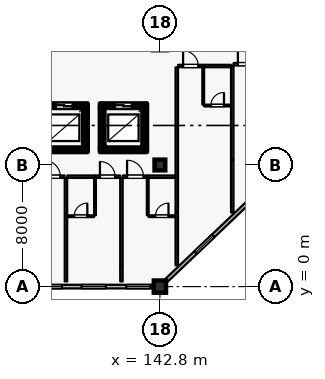
"""IFC4 building model, lengths in metres.
Left out: names, types, materials, properties, quantities, classifications, styles, units other than length and angle.
Written with IfcOpenShell. Run it as: python <this file> out.ifc"""

import sys

from ifc_helpers import new_model, si_unit, direction, frame, frame_2d, origin, origin_2d, place, context, subcontext, project, spatial, rectangle, extrude, element, fill, save


model = new_model("IFC4")
c1 = context("Model", 3, precision=1e-05, world=origin(), true_north=direction((0.0, 1.0)))
c2 = subcontext(c1, "Body", "Model", "MODEL_VIEW")
j1 = project(units=[si_unit("LENGTHUNIT", "METRE"), si_unit("PLANEANGLEUNIT", "RADIAN")], contexts=[c1])
p1 = place(None, origin())
s1 = spatial("IfcSite", under=j1, at=p1, CompositionType="ELEMENT")
p2 = place(p1, origin())
s2 = spatial("IfcBuilding", under=s1, at=p2, CompositionType="ELEMENT")
p3 = place(p2, frame((0.0, 0.0, 11.4)))
s3 = spatial("IfcBuildingStorey", under=s2, at=p3, CompositionType="ELEMENT", Elevation=11.4)
p4 = place(p3, frame((142.8, 0.0, 0.0), z_axis=(0.0, 0.0, 1.0), x_axis=(1.0, 0.0, 0.0)))
e1 = element("IfcColumn", 1, at=p4, inside=s3, PredefinedType="COLUMN", context=c2, shape_type="SweptSolid", body=[
    extrude(rectangle(XDim=0.8, YDim=0.8, at=origin_2d()), origin(), (0.0, 0.0, 1.0), 4.8),
])
p5 = place(p3, frame((142.8, 8.0, 0.0), z_axis=(0.0, 0.0, 1.0), x_axis=(1.0, 0.0, 0.0)))
e2 = element("IfcColumn", 2, at=p5, inside=s3, PredefinedType="COLUMN", context=c2, shape_type="SweptSolid", body=[
    extrude(rectangle(XDim=0.7, YDim=0.7, at=origin_2d()), origin(), (0.0, 0.0, 1.0), 4.8),
])
p6 = place(p3, frame((142.4, 0.0, 0.0), z_axis=(0.0, 0.0, 1.0), x_axis=(-1.0, 0.0, 0.0)))
e3 = element("IfcWall", 3, at=p6, inside=s3, PredefinedType="SOLIDWALL", context=c2, shape_type="SweptSolid", body=[
    extrude(rectangle(XDim=7.6, YDim=0.24, at=frame_2d((3.8, 0.0))), origin(), (0.0, 0.0, 1.0), 4.13),
])
p7 = place(p6, frame((0.215, 0.0, 0.8)))
e4 = element("IfcOpeningElement", 4, at=p7, cuts=e3, PredefinedType="OPENING", context=c2, shape_type="SweptSolid", body=[
    extrude(rectangle(XDim=1.6, YDim=1.6, at=frame_2d((0.8, 0.8))), frame((0.0, 0.13, 0.0), z_axis=(0.0, -1.0, 0.0), x_axis=(1.0, 0.0, 0.0)), (0.0, 0.0, 1.0), 0.26),
])
p8 = place(p6, frame((3.155, 0.0, 0.8)))
e5 = element("IfcOpeningElement", 5, at=p8, cuts=e3, PredefinedType="OPENING", context=c2, shape_type="SweptSolid", body=[
    extrude(rectangle(XDim=1.6, YDim=1.6, at=frame_2d((0.8, 0.8))), frame((0.0, 0.13, 0.0), z_axis=(0.0, -1.0, 0.0), x_axis=(1.0, 0.0, 0.0)), (0.0, 0.0, 1.0), 0.26),
])
p9 = place(p6, frame((6.04, 0.0, 0.8)))
e6 = element("IfcOpeningElement", 6, at=p9, cuts=e3, PredefinedType="OPENING", context=c2, shape_type="SweptSolid", body=[
    extrude(rectangle(XDim=1.4, YDim=1.6, at=frame_2d((0.7, 0.8))), frame((0.0, 0.13, 0.0), z_axis=(0.0, -1.0, 0.0), x_axis=(1.0, 0.0, 0.0)), (0.0, 0.0, 1.0), 0.26),
])
p10 = place(p3, frame((150.8, 7.619, 0.0), z_axis=(0.0, 0.0, 1.0), x_axis=(-0.724156739794, -0.689635422677, 0.0)))
e7 = element("IfcWall", 7, at=p10, inside=s3, PredefinedType="SOLIDWALL", context=c2, shape_type="SweptSolid", body=[
    extrude(rectangle(XDim=10.495, YDim=0.24, at=frame_2d((5.248, 0.0))), origin(), (0.0, 0.0, 1.0), 4.13),
])
p11 = place(p10, frame((1.368, 0.0, 0.8)))
e8 = element("IfcOpeningElement", 8, at=p11, cuts=e7, PredefinedType="OPENING", context=c2, shape_type="SweptSolid", body=[
    extrude(rectangle(XDim=1.6, YDim=1.6, at=frame_2d((0.8, 0.8))), frame((0.0, 0.13, 0.0), z_axis=(0.0, -1.0, 0.0), x_axis=(1.0, 0.0, 0.0)), (0.0, 0.0, 1.0), 0.26),
])
p12 = place(p10, frame((6.194, 0.0, 0.8)))
e9 = element("IfcOpeningElement", 9, at=p12, cuts=e7, PredefinedType="OPENING", context=c2, shape_type="SweptSolid", body=[
    extrude(rectangle(XDim=1.6, YDim=1.6, at=frame_2d((0.8, 0.8))), frame((0.0, 0.13, 0.0), z_axis=(0.0, -1.0, 0.0), x_axis=(1.0, 0.0, 0.0)), (0.0, 0.0, 1.0), 0.26),
])
p13 = place(p3, frame((134.95, 9.0, 0.0), z_axis=(0.0, 0.0, 1.0), x_axis=(1.0, 0.0, 0.0)))
e10 = element("IfcWall", 10, at=p13, inside=s3, PredefinedType="SHEAR", context=c2, shape_type="SweptSolid", body=[
    extrude(rectangle(XDim=3.1, YDim=0.3, at=frame_2d((1.55, 0.0))), origin(), (0.0, 0.0, 1.0), 4.535),
])
p14 = place(p3, frame((137.9, 9.155, 0.0), z_axis=(0.0, 0.0, 1.0), x_axis=(0.0, 1.0, 0.0)))
e11 = element("IfcWall", 11, at=p14, inside=s3, PredefinedType="SHEAR", context=c2, shape_type="SweptSolid", body=[
    extrude(rectangle(XDim=2.59, YDim=0.3, at=frame_2d((1.295, 0.0))), origin(), (0.0, 0.0, 1.0), 4.535),
])
p15 = place(p3, frame((138.05, 11.9, 0.0), z_axis=(0.0, 0.0, 1.0), x_axis=(-1.0, 0.0, 0.0)))
e12 = element("IfcWall", 12, at=p15, inside=s3, PredefinedType="SHEAR", context=c2, shape_type="SweptSolid", body=[
    extrude(rectangle(XDim=3.1, YDim=0.3, at=frame_2d((1.55, 0.0))), origin(), (0.0, 0.0, 1.0), 4.535),
])
p16 = place(p15, frame((1.0, 0.0, 0.0)))
e13 = element("IfcOpeningElement", 13, at=p16, cuts=e12, PredefinedType="OPENING", context=c2, shape_type="SweptSolid", body=[
    extrude(rectangle(XDim=1.1, YDim=2.2, at=frame_2d((0.55, 1.1))), frame((0.0, 0.16, 0.0), z_axis=(0.0, -1.0, 0.0), x_axis=(1.0, 0.0, 0.0)), (0.0, 0.0, 1.0), 0.32),
])
p17 = place(p3, frame((138.85, 9.0, 0.0), z_axis=(0.0, 0.0, 1.0), x_axis=(1.0, 0.0, 0.0)))
e14 = element("IfcWall", 14, at=p17, inside=s3, PredefinedType="SHEAR", context=c2, shape_type="SweptSolid", body=[
    extrude(rectangle(XDim=3.1, YDim=0.3, at=frame_2d((1.55, 0.0))), origin(), (0.0, 0.0, 1.0), 4.535),
])
p18 = place(p3, frame((141.8, 9.155, 0.0), z_axis=(0.0, 0.0, 1.0), x_axis=(0.0, 1.0, 0.0)))
e15 = element("IfcWall", 15, at=p18, inside=s3, PredefinedType="SHEAR", context=c2, shape_type="SweptSolid", body=[
    extrude(rectangle(XDim=2.59, YDim=0.3, at=frame_2d((1.295, 0.0))), origin(), (0.0, 0.0, 1.0), 4.535),
])
p19 = place(p3, frame((141.95, 11.9, 0.0), z_axis=(0.0, 0.0, 1.0), x_axis=(-1.0, 0.0, 0.0)))
e16 = element("IfcWall", 16, at=p19, inside=s3, PredefinedType="SHEAR", context=c2, shape_type="SweptSolid", body=[
    extrude(rectangle(XDim=3.1, YDim=0.3, at=frame_2d((1.55, 0.0))), origin(), (0.0, 0.0, 1.0), 4.535),
])
p20 = place(p19, frame((1.0, 0.0, 0.0)))
e17 = element("IfcOpeningElement", 17, at=p20, cuts=e16, PredefinedType="OPENING", context=c2, shape_type="SweptSolid", body=[
    extrude(rectangle(XDim=1.1, YDim=2.2, at=frame_2d((0.55, 1.1))), frame((0.0, 0.16, 0.0), z_axis=(0.0, -1.0, 0.0), x_axis=(1.0, 0.0, 0.0)), (0.0, 0.0, 1.0), 0.32),
])
p21 = place(p3, frame((139.0, 11.745, 0.0), z_axis=(0.0, 0.0, 1.0), x_axis=(0.0, -1.0, 0.0)))
e18 = element("IfcWall", 18, at=p21, inside=s3, PredefinedType="SHEAR", context=c2, shape_type="SweptSolid", body=[
    extrude(rectangle(XDim=2.59, YDim=0.3, at=frame_2d((1.295, 0.0))), origin(), (0.0, 0.0, 1.0), 4.535),
])
p22 = place(p3, frame((134.89, 7.23, 0.0), z_axis=(0.0, 0.0, 1.0), x_axis=(1.0, 0.0, 0.0)))
e19 = element("IfcWall", 19, at=p22, inside=s3, PredefinedType="PARTITIONING", context=c2, shape_type="SweptSolid", body=[
    extrude(rectangle(XDim=1.64, YDim=0.16, at=frame_2d((0.82, 0.0))), origin(), (0.0, 0.0, 1.0), 4.535),
])
p23 = place(p22, frame((0.28, 0.0, 0.0)))
e20 = element("IfcOpeningElement", 20, at=p23, cuts=e19, PredefinedType="OPENING", context=c2, shape_type="SweptSolid", body=[
    extrude(rectangle(XDim=1.08, YDim=2.3, at=frame_2d((0.54, 1.15))), frame((0.0, 0.09, 0.0), z_axis=(0.0, -1.0, 0.0), x_axis=(1.0, 0.0, 0.0)), (0.0, 0.0, 1.0), 0.18),
])
p24 = place(p3, frame((136.71, 7.23, 0.0), z_axis=(0.0, 0.0, 1.0), x_axis=(1.0, 0.0, 0.0)))
e21 = element("IfcWall", 21, at=p24, inside=s3, PredefinedType="PARTITIONING", context=c2, shape_type="SweptSolid", body=[
    extrude(rectangle(XDim=1.81, YDim=0.16, at=frame_2d((0.905, 0.0))), origin(), (0.0, 0.0, 1.0), 4.535),
])
p25 = place(p3, frame((138.53, 7.23, 0.0), z_axis=(0.0, 0.0, 1.0), x_axis=(1.0, 0.0, 0.0)))
e22 = element("IfcWall", 22, at=p25, inside=s3, PredefinedType="PARTITIONING", context=c2, shape_type="SweptSolid", body=[
    extrude(rectangle(XDim=1.65, YDim=0.16, at=frame_2d((0.825, 0.0))), origin(), (0.0, 0.0, 1.0), 4.535),
])
p26 = place(p25, frame((0.325, 0.0, 0.0)))
e23 = element("IfcOpeningElement", 23, at=p26, cuts=e22, PredefinedType="OPENING", context=c2, shape_type="SweptSolid", body=[
    extrude(rectangle(XDim=1.0, YDim=2.25, at=frame_2d((0.5, 1.125))), frame((0.0, 0.09, 0.0), z_axis=(0.0, -1.0, 0.0), x_axis=(1.0, 0.0, 0.0)), (0.0, 0.0, 1.0), 0.18),
])
p27 = place(p3, frame((138.53, 4.69, 0.0), z_axis=(0.0, 0.0, 1.0), x_axis=(0.0, 1.0, 0.0)))
e24 = element("IfcWall", 24, at=p27, inside=s3, PredefinedType="PARTITIONING", context=c2, shape_type="SweptSolid", body=[
    extrude(rectangle(XDim=2.45, YDim=0.115, at=frame_2d((1.225, 0.0))), origin(), (0.0, 0.0, 1.0), 4.535),
])
p28 = place(p3, frame((136.72, 4.63, 0.0), z_axis=(0.0, 0.0, 1.0), x_axis=(1.0, 0.0, 0.0)))
e25 = element("IfcWall", 25, at=p28, inside=s3, PredefinedType="PARTITIONING", context=c2, shape_type="SweptSolid", body=[
    extrude(rectangle(XDim=1.75, YDim=0.115, at=frame_2d((0.875, 0.0))), origin(), (0.0, 0.0, 1.0), 4.535),
])
p29 = place(p28, frame((0.445, 0.0, 0.0)))
e26 = element("IfcOpeningElement", 26, at=p29, cuts=e25, PredefinedType="OPENING", context=c2, shape_type="SweptSolid", body=[
    extrude(rectangle(XDim=0.86, YDim=2.12, at=frame_2d((0.43, 1.06))), frame((0.0, 0.067, 0.0), z_axis=(0.0, -1.0, 0.0), x_axis=(1.0, 0.0, 0.0)), (0.0, 0.0, 1.0), 0.135),
])
p30 = place(p3, frame((136.62, 0.34, 0.0), z_axis=(0.0, 0.0, 1.0), x_axis=(0.0, 1.0, 0.0)))
e27 = element("IfcWall", 27, at=p30, inside=s3, PredefinedType="PARTITIONING", context=c2, shape_type="SweptSolid", body=[
    extrude(rectangle(XDim=6.8, YDim=0.16, at=frame_2d((3.4, 0.0))), origin(), (0.0, 0.0, 1.0), 4.535),
])
p31 = place(p3, frame((140.27, 0.34, 0.0), z_axis=(0.0, 0.0, 1.0), x_axis=(0.0, 1.0, 0.0)))
e28 = element("IfcWall", 28, at=p31, inside=s3, PredefinedType="PARTITIONING", context=c2, shape_type="SweptSolid", body=[
    extrude(rectangle(XDim=1.05, YDim=0.16, at=frame_2d((0.525, 0.0))), origin(), (0.0, 0.0, 1.0), 4.535),
])
p32 = place(p3, frame((140.36, 7.23, 0.0), z_axis=(0.0, 0.0, 1.0), x_axis=(1.0, 0.0, 0.0)))
e29 = element("IfcWall", 29, at=p32, inside=s3, PredefinedType="PARTITIONING", context=c2, shape_type="SweptSolid", body=[
    extrude(rectangle(XDim=1.64, YDim=0.16, at=frame_2d((0.82, 0.0))), origin(), (0.0, 0.0, 1.0), 4.535),
])
p33 = place(p32, frame((0.28, 0.0, 0.0)))
e30 = element("IfcOpeningElement", 30, at=p33, cuts=e29, PredefinedType="OPENING", context=c2, shape_type="SweptSolid", body=[
    extrude(rectangle(XDim=1.08, YDim=2.3, at=frame_2d((0.54, 1.15))), frame((0.0, 0.09, 0.0), z_axis=(0.0, -1.0, 0.0), x_axis=(1.0, 0.0, 0.0)), (0.0, 0.0, 1.0), 0.18),
])
p34 = place(p3, frame((142.01, 7.23, 0.0), z_axis=(0.0, 0.0, 1.0), x_axis=(1.0, 0.0, 0.0)))
e31 = element("IfcWall", 31, at=p34, inside=s3, PredefinedType="PARTITIONING", context=c2, shape_type="SweptSolid", body=[
    extrude(rectangle(XDim=1.81, YDim=0.16, at=frame_2d((0.905, 0.0))), origin(), (0.0, 0.0, 1.0), 4.535),
])
p35 = place(p3, frame((142.0, 4.69, 0.0), z_axis=(0.0, 0.0, 1.0), x_axis=(0.0, 1.0, 0.0)))
e32 = element("IfcWall", 32, at=p35, inside=s3, PredefinedType="PARTITIONING", context=c2, shape_type="SweptSolid", body=[
    extrude(rectangle(XDim=2.45, YDim=0.115, at=frame_2d((1.225, 0.0))), origin(), (0.0, 0.0, 1.0), 4.535),
])
p36 = place(p3, frame((142.06, 4.63, 0.0), z_axis=(0.0, 0.0, 1.0), x_axis=(1.0, 0.0, 0.0)))
e33 = element("IfcWall", 33, at=p36, inside=s3, PredefinedType="PARTITIONING", context=c2, shape_type="SweptSolid", body=[
    extrude(rectangle(XDim=1.75, YDim=0.115, at=frame_2d((0.875, 0.0))), origin(), (0.0, 0.0, 1.0), 4.535),
])
p37 = place(p36, frame((0.445, 0.0, 0.0)))
e34 = element("IfcOpeningElement", 34, at=p37, cuts=e33, PredefinedType="OPENING", context=c2, shape_type="SweptSolid", body=[
    extrude(rectangle(XDim=0.86, YDim=2.12, at=frame_2d((0.43, 1.06))), frame((0.0, 0.067, 0.0), z_axis=(0.0, -1.0, 0.0), x_axis=(1.0, 0.0, 0.0)), (0.0, 0.0, 1.0), 0.135),
])
p38 = place(p3, frame((140.27, 1.4, 0.0), z_axis=(0.0, 0.0, 1.0), x_axis=(0.0, 1.0, 0.0)))
e35 = element("IfcWall", 35, at=p38, inside=s3, PredefinedType="PARTITIONING", context=c2, shape_type="SweptSolid", body=[
    extrude(rectangle(XDim=5.74, YDim=0.16, at=frame_2d((2.87, 0.0))), origin(), (0.0, 0.0, 1.0), 4.535),
])
p39 = place(p3, frame((143.91, 1.4, 0.0), z_axis=(0.0, 0.0, 1.0), x_axis=(0.0, 1.0, 0.0)))
e36 = element("IfcWall", 36, at=p39, inside=s3, PredefinedType="PARTITIONING", context=c2, shape_type="SweptSolid", body=[
    extrude(rectangle(XDim=3.46, YDim=0.16, at=frame_2d((1.73, 0.0))), origin(), (0.0, 0.0, 1.0), 4.535),
])
p40 = place(p3, frame((144.0, 14.51, 0.0), z_axis=(0.0, 0.0, 1.0), x_axis=(1.0, 0.0, 0.0)))
e37 = element("IfcWall", 37, at=p40, inside=s3, PredefinedType="PARTITIONING", context=c2, shape_type="SweptSolid", body=[
    extrude(rectangle(XDim=1.65, YDim=0.16, at=frame_2d((0.825, 0.0))), origin(), (0.0, 0.0, 1.0), 4.535),
])
p41 = place(p40, frame((0.325, 0.0, 0.0)))
e38 = element("IfcOpeningElement", 38, at=p41, cuts=e37, PredefinedType="OPENING", context=c2, shape_type="SweptSolid", body=[
    extrude(rectangle(XDim=1.0, YDim=2.25, at=frame_2d((0.5, 1.125))), frame((0.0, 0.09, 0.0), z_axis=(0.0, -1.0, 0.0), x_axis=(1.0, 0.0, 0.0)), (0.0, 0.0, 1.0), 0.18),
])
p42 = place(p3, frame((145.66, 14.51, 0.0), z_axis=(0.0, 0.0, 1.0), x_axis=(1.0, 0.0, 0.0)))
e39 = element("IfcWall", 39, at=p42, inside=s3, PredefinedType="PARTITIONING", context=c2, shape_type="SweptSolid", body=[
    extrude(rectangle(XDim=1.81, YDim=0.16, at=frame_2d((0.905, 0.0))), origin(), (0.0, 0.0, 1.0), 4.535),
])
p43 = place(p3, frame((145.65, 11.97, 0.0), z_axis=(0.0, 0.0, 1.0), x_axis=(0.0, 1.0, 0.0)))
e40 = element("IfcWall", 40, at=p43, inside=s3, PredefinedType="PARTITIONING", context=c2, shape_type="SweptSolid", body=[
    extrude(rectangle(XDim=2.45, YDim=0.115, at=frame_2d((1.225, 0.0))), origin(), (0.0, 0.0, 1.0), 4.535),
])
p44 = place(p3, frame((145.71, 11.91, 0.0), z_axis=(0.0, 0.0, 1.0), x_axis=(1.0, 0.0, 0.0)))
e41 = element("IfcWall", 41, at=p44, inside=s3, PredefinedType="PARTITIONING", context=c2, shape_type="SweptSolid", body=[
    extrude(rectangle(XDim=1.75, YDim=0.115, at=frame_2d((0.875, 0.0))), origin(), (0.0, 0.0, 1.0), 4.535),
])
p45 = place(p44, frame((0.445, 0.0, 0.0)))
e42 = element("IfcOpeningElement", 42, at=p45, cuts=e41, PredefinedType="OPENING", context=c2, shape_type="SweptSolid", body=[
    extrude(rectangle(XDim=0.86, YDim=2.12, at=frame_2d((0.43, 1.06))), frame((0.0, 0.067, 0.0), z_axis=(0.0, -1.0, 0.0), x_axis=(1.0, 0.0, 0.0)), (0.0, 0.0, 1.0), 0.135),
])
p46 = place(p3, frame((143.91, 4.87, 0.0), z_axis=(0.0, 0.0, 1.0), x_axis=(0.0, 1.0, 0.0)))
e43 = element("IfcWall", 43, at=p46, inside=s3, PredefinedType="PARTITIONING", context=c2, shape_type="SweptSolid", body=[
    extrude(rectangle(XDim=9.55, YDim=0.16, at=frame_2d((4.775, 0.0))), origin(), (0.0, 0.0, 1.0), 4.535),
])
p47 = place(p3, frame((147.56, 4.87, 0.0), z_axis=(0.0, 0.0, 1.0), x_axis=(0.0, 1.0, 0.0)))
e44 = element("IfcWall", 44, at=p47, inside=s3, PredefinedType="PARTITIONING", context=c2, shape_type="SweptSolid", body=[
    extrude(rectangle(XDim=3.46, YDim=0.16, at=frame_2d((1.73, 0.0))), origin(), (0.0, 0.0, 1.0), 4.535),
])
p48 = place(p3, frame((147.65, 14.63, 0.0), z_axis=(0.0, 0.0, 1.0), x_axis=(1.0, 0.0, 0.0)))
e45 = element("IfcWall", 45, at=p48, inside=s3, PredefinedType="PARTITIONING", context=c2, shape_type="SweptSolid", body=[
    extrude(rectangle(XDim=1.64, YDim=0.16, at=frame_2d((0.82, 0.0))), origin(), (0.0, 0.0, 1.0), 4.535),
])
p49 = place(p48, frame((0.28, 0.0, 0.0)))
e46 = element("IfcOpeningElement", 46, at=p49, cuts=e45, PredefinedType="OPENING", context=c2, shape_type="SweptSolid", body=[
    extrude(rectangle(XDim=1.08, YDim=2.3, at=frame_2d((0.54, 1.15))), frame((0.0, 0.09, 0.0), z_axis=(0.0, -1.0, 0.0), x_axis=(1.0, 0.0, 0.0)), (0.0, 0.0, 1.0), 0.18),
])
p50 = place(p3, frame((147.56, 8.34, 0.0), z_axis=(0.0, 0.0, 1.0), x_axis=(0.0, 1.0, 0.0)))
e47 = element("IfcWall", 47, at=p50, inside=s3, PredefinedType="PARTITIONING", context=c2, shape_type="SweptSolid", body=[
    extrude(rectangle(XDim=6.2, YDim=0.16, at=frame_2d((3.1, 0.0))), origin(), (0.0, 0.0, 1.0), 4.535),
])
p51 = place(p7, origin())
e48 = element("IfcWindow", 48, at=p51, inside=s3, PartitioningType="SINGLE_PANEL", PredefinedType="WINDOW", context=c2, shape_type="SweptSolid", body=[
    extrude(rectangle(XDim=1.6, YDim=1.6, at=frame_2d((0.8, 0.8))), frame((0.0, 0.03, 0.0), z_axis=(0.0, -1.0, 0.0), x_axis=(1.0, 0.0, 0.0)), (0.0, 0.0, 1.0), 0.06),
])
fill(e4, e48)
p52 = place(p8, origin())
e49 = element("IfcWindow", 49, at=p52, inside=s3, PartitioningType="SINGLE_PANEL", PredefinedType="WINDOW", context=c2, shape_type="SweptSolid", body=[
    extrude(rectangle(XDim=1.6, YDim=1.6, at=frame_2d((0.8, 0.8))), frame((0.0, 0.03, 0.0), z_axis=(0.0, -1.0, 0.0), x_axis=(1.0, 0.0, 0.0)), (0.0, 0.0, 1.0), 0.06),
])
fill(e5, e49)
p53 = place(p9, origin())
e50 = element("IfcWindow", 50, at=p53, inside=s3, PartitioningType="SINGLE_PANEL", PredefinedType="WINDOW", context=c2, shape_type="SweptSolid", body=[
    extrude(rectangle(XDim=1.4, YDim=1.6, at=frame_2d((0.7, 0.8))), frame((0.0, 0.03, 0.0), z_axis=(0.0, -1.0, 0.0), x_axis=(1.0, 0.0, 0.0)), (0.0, 0.0, 1.0), 0.06),
])
fill(e6, e50)
p54 = place(p12, origin())
e51 = element("IfcWindow", 51, at=p54, inside=s3, PartitioningType="SINGLE_PANEL", PredefinedType="WINDOW", context=c2, shape_type="SweptSolid", body=[
    extrude(rectangle(XDim=1.6, YDim=1.6, at=frame_2d((0.8, 0.8))), frame((0.0, 0.03, 0.0), z_axis=(0.0, -1.0, 0.0), x_axis=(1.0, 0.0, 0.0)), (0.0, 0.0, 1.0), 0.06),
])
fill(e9, e51)
p55 = place(p16, origin())
e52 = element("IfcDoor", 52, at=p55, inside=s3, OperationType="DOUBLE_DOOR_SLIDING", PredefinedType="DOOR", context=c2, shape_type="SweptSolid", body=[
    extrude(rectangle(XDim=1.1, YDim=2.2, at=frame_2d((0.55, 1.1))), frame((0.0, 0.025, 0.0), z_axis=(0.0, -1.0, 0.0), x_axis=(1.0, 0.0, 0.0)), (0.0, 0.0, 1.0), 0.05),
])
fill(e13, e52)
p56 = place(p20, origin())
e53 = element("IfcDoor", 53, at=p56, inside=s3, OperationType="DOUBLE_DOOR_SLIDING", PredefinedType="DOOR", context=c2, shape_type="SweptSolid", body=[
    extrude(rectangle(XDim=1.1, YDim=2.2, at=frame_2d((0.55, 1.1))), frame((0.0, 0.025, 0.0), z_axis=(0.0, -1.0, 0.0), x_axis=(1.0, 0.0, 0.0)), (0.0, 0.0, 1.0), 0.05),
])
fill(e17, e53)
p57 = place(p23, origin())
e54 = element("IfcDoor", 54, at=p57, inside=s3, OperationType="SINGLE_SWING_LEFT", PredefinedType="DOOR", context=c2, shape_type="SweptSolid", body=[
    extrude(rectangle(XDim=1.08, YDim=2.3, at=frame_2d((0.54, 1.15))), frame((0.0, 0.025, 0.0), z_axis=(0.0, -1.0, 0.0), x_axis=(1.0, 0.0, 0.0)), (0.0, 0.0, 1.0), 0.05),
])
fill(e20, e54)
p58 = place(p26, origin())
e55 = element("IfcDoor", 55, at=p58, inside=s3, OperationType="SINGLE_SWING_LEFT", PredefinedType="DOOR", context=c2, shape_type="SweptSolid", body=[
    extrude(rectangle(XDim=1.0, YDim=2.25, at=frame_2d((0.5, 1.125))), frame((0.0, 0.025, 0.0), z_axis=(0.0, -1.0, 0.0), x_axis=(1.0, 0.0, 0.0)), (0.0, 0.0, 1.0), 0.05),
])
fill(e23, e55)
p59 = place(p29, origin())
e56 = element("IfcDoor", 56, at=p59, inside=s3, OperationType="SINGLE_SWING_RIGHT", PredefinedType="DOOR", context=c2, shape_type="SweptSolid", body=[
    extrude(rectangle(XDim=0.86, YDim=2.12, at=frame_2d((0.43, 1.06))), frame((0.0, 0.025, 0.0), z_axis=(0.0, -1.0, 0.0), x_axis=(1.0, 0.0, 0.0)), (0.0, 0.0, 1.0), 0.05),
])
fill(e26, e56)
p60 = place(p33, origin())
e57 = element("IfcDoor", 57, at=p60, inside=s3, OperationType="SINGLE_SWING_LEFT", PredefinedType="DOOR", context=c2, shape_type="SweptSolid", body=[
    extrude(rectangle(XDim=1.08, YDim=2.3, at=frame_2d((0.54, 1.15))), frame((0.0, 0.025, 0.0), z_axis=(0.0, -1.0, 0.0), x_axis=(1.0, 0.0, 0.0)), (0.0, 0.0, 1.0), 0.05),
])
fill(e30, e57)
p61 = place(p37, origin())
e58 = element("IfcDoor", 58, at=p61, inside=s3, OperationType="SINGLE_SWING_RIGHT", PredefinedType="DOOR", context=c2, shape_type="SweptSolid", body=[
    extrude(rectangle(XDim=0.86, YDim=2.12, at=frame_2d((0.43, 1.06))), frame((0.0, 0.025, 0.0), z_axis=(0.0, -1.0, 0.0), x_axis=(1.0, 0.0, 0.0)), (0.0, 0.0, 1.0), 0.05),
])
fill(e34, e58)
p62 = place(p41, origin())
e59 = element("IfcDoor", 59, at=p62, inside=s3, OperationType="SINGLE_SWING_LEFT", PredefinedType="DOOR", context=c2, shape_type="SweptSolid", body=[
    extrude(rectangle(XDim=1.0, YDim=2.25, at=frame_2d((0.5, 1.125))), frame((0.0, 0.025, 0.0), z_axis=(0.0, -1.0, 0.0), x_axis=(1.0, 0.0, 0.0)), (0.0, 0.0, 1.0), 0.05),
])
fill(e38, e59)
p63 = place(p45, origin())
e60 = element("IfcDoor", 60, at=p63, inside=s3, OperationType="SINGLE_SWING_RIGHT", PredefinedType="DOOR", context=c2, shape_type="SweptSolid", body=[
    extrude(rectangle(XDim=0.86, YDim=2.12, at=frame_2d((0.43, 1.06))), frame((0.0, 0.025, 0.0), z_axis=(0.0, -1.0, 0.0), x_axis=(1.0, 0.0, 0.0)), (0.0, 0.0, 1.0), 0.05),
])
fill(e42, e60)
p64 = place(p49, origin())
e61 = element("IfcDoor", 61, at=p64, inside=s3, OperationType="SINGLE_SWING_LEFT", PredefinedType="DOOR", context=c2, shape_type="SweptSolid", body=[
    extrude(rectangle(XDim=1.08, YDim=2.3, at=frame_2d((0.54, 1.15))), frame((0.0, 0.025, 0.0), z_axis=(0.0, -1.0, 0.0), x_axis=(1.0, 0.0, 0.0)), (0.0, 0.0, 1.0), 0.05),
])
fill(e46, e61)
save(model, sys.argv[1])
